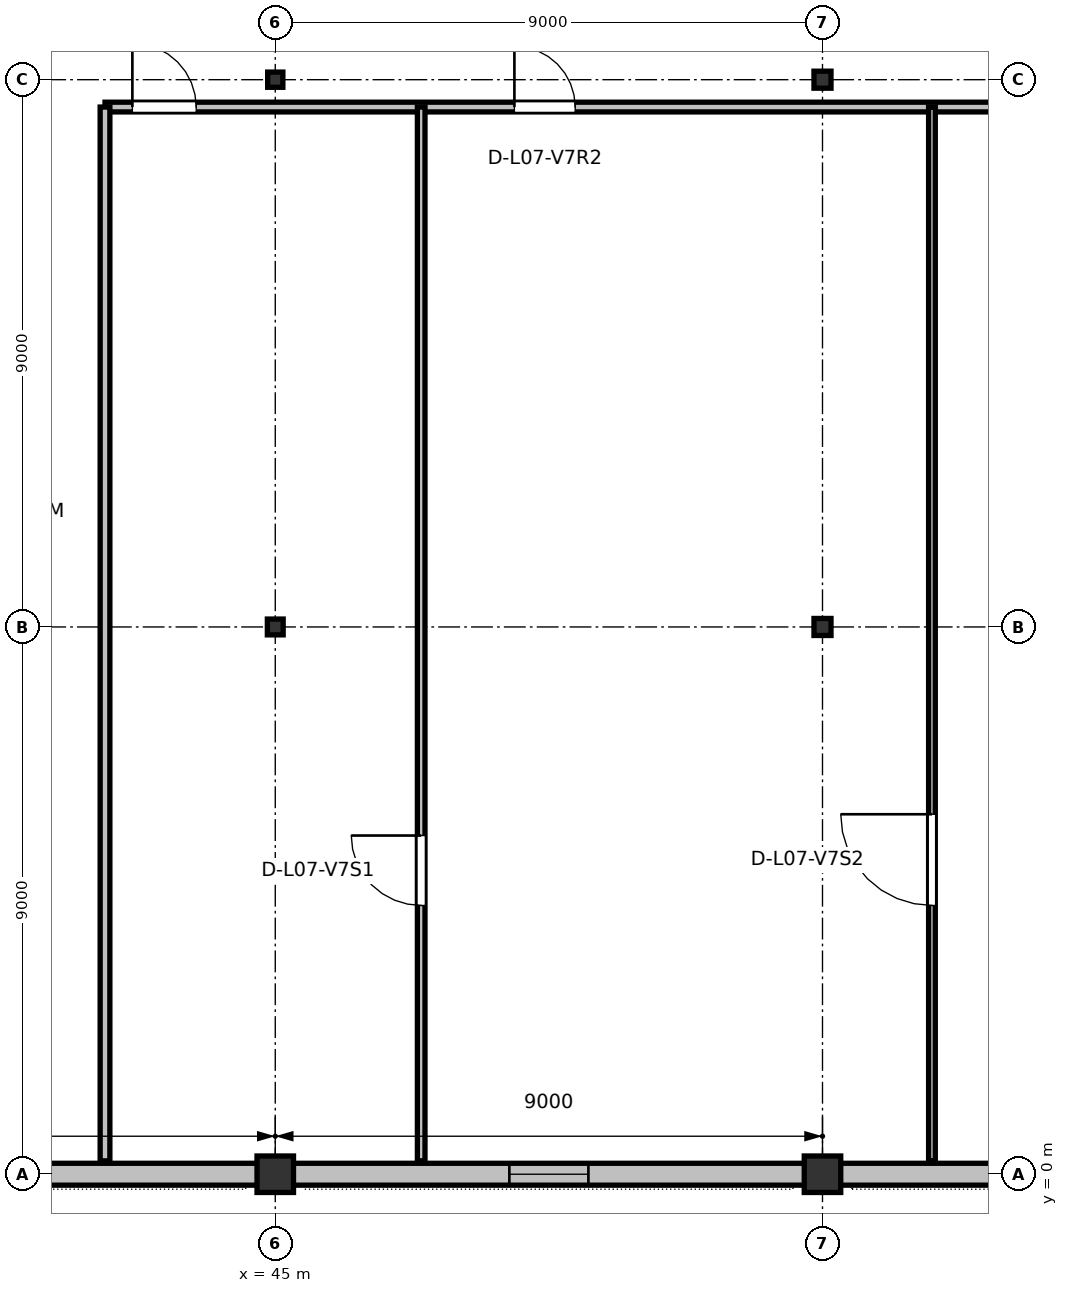
"""IFC4 building model, lengths in metres.
Left out: names, types, materials, properties, quantities, classifications, styles, units other than length and angle.
Written with IfcOpenShell. Run it as: python <this file> out.ifc"""

import sys

from ifc_helpers import new_model, si_unit, direction, frame, frame_2d, origin, origin_2d, place, context, subcontext, project, spatial, rectangle, hollow_rectangle, i_section, extrude, element, fill, save


model = new_model("IFC4")
c1 = context("Model", 3, precision=1e-05, world=origin(), true_north=direction((0.0, 1.0)))
c2 = subcontext(c1, "Body", "Model", "MODEL_VIEW")
j1 = project(units=[si_unit("LENGTHUNIT", "METRE"), si_unit("PLANEANGLEUNIT", "RADIAN")], contexts=[c1])
p1 = place(None, origin())
s1 = spatial("IfcSite", under=j1, at=p1, CompositionType="ELEMENT")
p2 = place(p1, origin())
s2 = spatial("IfcBuilding", under=s1, at=p2, CompositionType="ELEMENT")
p3 = place(p2, frame((0.0, 0.0, 31.8)))
s3 = spatial("IfcBuildingStorey", under=s2, at=p3, CompositionType="ELEMENT", Elevation=31.8)
p4 = place(p3, frame((45.0, 0.0, 0.0), z_axis=(0.0, 0.0, 1.0), x_axis=(1.0, 0.0, 0.0)))
e1 = element("IfcColumn", 1, at=p4, inside=s3, PredefinedType="COLUMN", context=c2, shape_type="SweptSolid", body=[
    extrude(rectangle(XDim=0.6, YDim=0.6, at=origin_2d()), origin(), (0.0, 0.0, 1.0), 4.2),
])
p5 = place(p3, frame((45.0, 9.0, 0.0), z_axis=(0.0, 0.0, 1.0), x_axis=(1.0, 0.0, 0.0)))
e2 = element("IfcColumn", 2, at=p5, inside=s3, PredefinedType="COLUMN", context=c2, shape_type="SweptSolid", body=[
    extrude(i_section(OverallWidth=0.26, OverallDepth=0.26, WebThickness=0.01, FlangeThickness=0.018, at=origin_2d()), origin(), (0.0, 0.0, 1.0), 4.2),
])
p6 = place(p3, frame((45.0, 18.0, 0.0), z_axis=(0.0, 0.0, 1.0), x_axis=(1.0, 0.0, 0.0)))
e3 = element("IfcColumn", 3, at=p6, inside=s3, PredefinedType="COLUMN", context=c2, shape_type="SweptSolid", body=[
    extrude(hollow_rectangle(XDim=0.25, YDim=0.25, WallThickness=0.012, at=origin_2d()), origin(), (0.0, 0.0, 1.0), 4.2),
])
p7 = place(p3, frame((54.0, 0.0, 0.0), z_axis=(0.0, 0.0, 1.0), x_axis=(1.0, 0.0, 0.0)))
e4 = element("IfcColumn", 4, at=p7, inside=s3, PredefinedType="COLUMN", context=c2, shape_type="SweptSolid", body=[
    extrude(rectangle(XDim=0.6, YDim=0.6, at=origin_2d()), origin(), (0.0, 0.0, 1.0), 4.2),
])
for number, where, z_axis, x_axis in (
    (5, (54.0, 9.0, 0.0), (0.0, 0.0, 1.0), (1.0, 0.0, 0.0)),
    (6, (54.0, 18.0, 0.0), (0.0, 0.0, 1.0), (1.0, 0.0, 0.0)),
):
    element("IfcColumn", number, at=place(p3, frame(where, z_axis=z_axis, x_axis=x_axis)), inside=s3, PredefinedType="COLUMN", context=c2, shape_type="SweptSolid", body=[
        extrude(i_section(OverallWidth=0.28, OverallDepth=0.28, WebThickness=0.01, FlangeThickness=0.018, at=origin_2d()), origin(), (0.0, 0.0, 1.0), 4.2),
    ])
p8 = place(p3, frame((36.285, 0.0, 0.0), z_axis=(0.0, 0.0, 1.0), x_axis=(1.0, 0.0, 0.0)))
e7 = element("IfcWall", 7, at=p8, inside=s3, PredefinedType="STANDARD", context=c2, shape_type="SweptSolid", body=[
    extrude(rectangle(XDim=8.43, YDim=0.36, at=frame_2d((4.215, 0.0))), origin(), (0.0, 0.0, 1.0), 3.735),
])
p9 = place(p8, frame((0.75, 0.0, 0.9)))
e8 = element("IfcOpeningElement", 8, at=p9, cuts=e7, PredefinedType="OPENING", context=c2, shape_type="SweptSolid", body=[
    extrude(rectangle(XDim=1.4, YDim=1.9, at=frame_2d((0.7, 0.95))), frame((0.0, 0.19, 0.0), z_axis=(0.0, -1.0, 0.0), x_axis=(1.0, 0.0, 0.0)), (0.0, 0.0, 1.0), 0.38),
])
p10 = place(p3, frame((45.285, 0.0, 0.0), z_axis=(0.0, 0.0, 1.0), x_axis=(1.0, 0.0, 0.0)))
e9 = element("IfcWall", 9, at=p10, inside=s3, PredefinedType="STANDARD", context=c2, shape_type="SweptSolid", body=[
    extrude(rectangle(XDim=8.43, YDim=0.36, at=frame_2d((4.215, 0.0))), origin(), (0.0, 0.0, 1.0), 3.735),
])
p11 = place(p10, frame((3.565, 0.0, 0.9)))
e10 = element("IfcOpeningElement", 10, at=p11, cuts=e9, PredefinedType="OPENING", context=c2, shape_type="SweptSolid", body=[
    extrude(rectangle(XDim=1.3, YDim=1.85, at=frame_2d((0.65, 0.925))), frame((0.0, 0.19, 0.0), z_axis=(0.0, -1.0, 0.0), x_axis=(1.0, 0.0, 0.0)), (0.0, 0.0, 1.0), 0.38),
])
p12 = place(p3, frame((54.285, 0.0, 0.0), z_axis=(0.0, 0.0, 1.0), x_axis=(1.0, 0.0, 0.0)))
e11 = element("IfcWall", 11, at=p12, inside=s3, PredefinedType="STANDARD", context=c2, shape_type="SweptSolid", body=[
    extrude(rectangle(XDim=8.43, YDim=0.36, at=frame_2d((4.215, 0.0))), origin(), (0.0, 0.0, 1.0), 3.735),
])
p13 = place(p12, frame((3.615, 0.0, 0.9)))
e12 = element("IfcOpeningElement", 12, at=p13, cuts=e11, PredefinedType="OPENING", context=c2, shape_type="SweptSolid", body=[
    extrude(rectangle(XDim=1.2, YDim=1.8, at=frame_2d((0.6, 0.9))), frame((0.0, 0.19, 0.0), z_axis=(0.0, -1.0, 0.0), x_axis=(1.0, 0.0, 0.0)), (0.0, 0.0, 1.0), 0.38),
])
p14 = place(p3, frame((42.2, 17.55, 0.0), z_axis=(0.0, 0.0, 1.0), x_axis=(1.0, 0.0, 0.0)))
e13 = element("IfcWall", 13, at=p14, inside=s3, PredefinedType="PARTITIONING", context=c2, shape_type="SweptSolid", body=[
    extrude(rectangle(XDim=23.6, YDim=0.16, at=frame_2d((11.8, 0.0))), origin(), (0.0, 0.0, 1.0), 3.96),
])
p15 = place(p14, frame((0.45, 0.0, 0.0)))
e14 = element("IfcOpeningElement", 14, at=p15, cuts=e13, PredefinedType="OPENING", context=c2, shape_type="SweptSolid", body=[
    extrude(rectangle(XDim=1.05, YDim=2.15, at=frame_2d((0.525, 1.075))), frame((0.0, 0.09, 0.0), z_axis=(0.0, -1.0, 0.0), x_axis=(1.0, 0.0, 0.0)), (0.0, 0.0, 1.0), 0.18),
])
p16 = place(p14, frame((6.733, 0.0, 0.0)))
e15 = element("IfcOpeningElement", 15, at=p16, cuts=e13, PredefinedType="OPENING", context=c2, shape_type="SweptSolid", body=[
    extrude(rectangle(XDim=1.0, YDim=2.14, at=frame_2d((0.5, 1.07))), frame((0.0, 0.09, 0.0), z_axis=(0.0, -1.0, 0.0), x_axis=(1.0, 0.0, 0.0)), (0.0, 0.0, 1.0), 0.18),
])
p17 = place(p14, frame((15.769, 0.0, 0.0)))
e16 = element("IfcOpeningElement", 16, at=p17, cuts=e13, PredefinedType="OPENING", context=c2, shape_type="SweptSolid", body=[
    extrude(rectangle(XDim=0.95, YDim=2.12, at=frame_2d((0.475, 1.06))), frame((0.0, 0.09, 0.0), z_axis=(0.0, -1.0, 0.0), x_axis=(1.0, 0.0, 0.0)), (0.0, 0.0, 1.0), 0.18),
])
p18 = place(p14, frame((22.25, 0.0, 0.0)))
e17 = element("IfcOpeningElement", 17, at=p18, cuts=e13, PredefinedType="OPENING", context=c2, shape_type="SweptSolid", body=[
    extrude(rectangle(XDim=0.9, YDim=2.1, at=frame_2d((0.45, 1.05))), frame((0.0, 0.09, 0.0), z_axis=(0.0, -1.0, 0.0), x_axis=(1.0, 0.0, 0.0)), (0.0, 0.0, 1.0), 0.18),
])
p19 = place(p3, frame((42.2, 0.22, 0.0), z_axis=(0.0, 0.0, 1.0), x_axis=(0.0, 1.0, 0.0)))
e18 = element("IfcWall", 18, at=p19, inside=s3, PredefinedType="PARTITIONING", context=c2, shape_type="SweptSolid", body=[
    extrude(rectangle(XDim=17.33, YDim=0.16, at=frame_2d((8.665, 0.0))), origin(), (0.0, 0.0, 1.0), 3.96),
])
p20 = place(p3, frame((47.4, 0.22, 0.0), z_axis=(0.0, 0.0, 1.0), x_axis=(0.0, 1.0, 0.0)))
e19 = element("IfcWall", 19, at=p20, inside=s3, PredefinedType="PARTITIONING", context=c2, shape_type="SweptSolid", body=[
    extrude(rectangle(XDim=17.33, YDim=0.125, at=frame_2d((8.665, 0.0))), origin(), (0.0, 0.0, 1.0), 3.96),
])
p21 = place(p20, frame((4.2, 0.0, 0.0)))
e20 = element("IfcOpeningElement", 20, at=p21, cuts=e19, PredefinedType="OPENING", context=c2, shape_type="SweptSolid", body=[
    extrude(rectangle(XDim=1.15, YDim=2.15, at=frame_2d((0.575, 1.075))), frame((0.0, 0.073, 0.0), z_axis=(0.0, -1.0, 0.0), x_axis=(1.0, 0.0, 0.0)), (0.0, 0.0, 1.0), 0.145),
])
p22 = place(p3, frame((55.8, 0.22, 0.0), z_axis=(0.0, 0.0, 1.0), x_axis=(0.0, 1.0, 0.0)))
e21 = element("IfcWall", 21, at=p22, inside=s3, PredefinedType="PARTITIONING", context=c2, shape_type="SweptSolid", body=[
    extrude(rectangle(XDim=17.33, YDim=0.11, at=frame_2d((8.665, 0.0))), origin(), (0.0, 0.0, 1.0), 3.96),
])
p23 = place(p22, frame((4.2, 0.0, 0.0)))
e22 = element("IfcOpeningElement", 22, at=p23, cuts=e21, PredefinedType="OPENING", context=c2, shape_type="SweptSolid", body=[
    extrude(rectangle(XDim=1.5, YDim=2.2, at=frame_2d((0.75, 1.1))), frame((0.0, 0.065, 0.0), z_axis=(0.0, -1.0, 0.0), x_axis=(1.0, 0.0, 0.0)), (0.0, 0.0, 1.0), 0.13),
])
p24 = place(p11, origin())
e23 = element("IfcWindow", 23, at=p24, inside=s3, PartitioningType="SINGLE_PANEL", PredefinedType="WINDOW", context=c2, shape_type="SweptSolid", body=[
    extrude(rectangle(XDim=1.3, YDim=1.85, at=frame_2d((0.65, 0.925))), frame((0.0, 0.03, 0.0), z_axis=(0.0, -1.0, 0.0), x_axis=(1.0, 0.0, 0.0)), (0.0, 0.0, 1.0), 0.06),
])
fill(e10, e23)
p25 = place(p15, origin())
e24 = element("IfcDoor", 24, at=p25, inside=s3, OperationType="SINGLE_SWING_LEFT", PredefinedType="DOOR", context=c2, shape_type="SweptSolid", body=[
    extrude(rectangle(XDim=1.05, YDim=2.15, at=frame_2d((0.525, 1.075))), frame((0.0, 0.025, 0.0), z_axis=(0.0, -1.0, 0.0), x_axis=(1.0, 0.0, 0.0)), (0.0, 0.0, 1.0), 0.05),
])
fill(e14, e24)
p26 = place(p21, origin())
e25 = element("IfcDoor", 25, at=p26, inside=s3, OperationType="SINGLE_SWING_RIGHT", PredefinedType="DOOR", context=c2, shape_type="SweptSolid", body=[
    extrude(rectangle(XDim=1.15, YDim=2.15, at=frame_2d((0.575, 1.075))), frame((0.0, 0.025, 0.0), z_axis=(0.0, -1.0, 0.0), x_axis=(1.0, 0.0, 0.0)), (0.0, 0.0, 1.0), 0.05),
])
fill(e20, e25)
p27 = place(p16, origin())
e26 = element("IfcDoor", 26, at=p27, inside=s3, OperationType="SINGLE_SWING_LEFT", PredefinedType="DOOR", context=c2, shape_type="SweptSolid", body=[
    extrude(rectangle(XDim=1.0, YDim=2.14, at=frame_2d((0.5, 1.07))), frame((0.0, 0.025, 0.0), z_axis=(0.0, -1.0, 0.0), x_axis=(1.0, 0.0, 0.0)), (0.0, 0.0, 1.0), 0.05),
])
fill(e15, e26)
p28 = place(p23, origin())
e27 = element("IfcDoor", 27, at=p28, inside=s3, OperationType="SINGLE_SWING_RIGHT", PredefinedType="DOOR", context=c2, shape_type="SweptSolid", body=[
    extrude(rectangle(XDim=1.5, YDim=2.2, at=frame_2d((0.75, 1.1))), frame((0.0, 0.025, 0.0), z_axis=(0.0, -1.0, 0.0), x_axis=(1.0, 0.0, 0.0)), (0.0, 0.0, 1.0), 0.05),
])
fill(e22, e27)
save(model, sys.argv[1])
